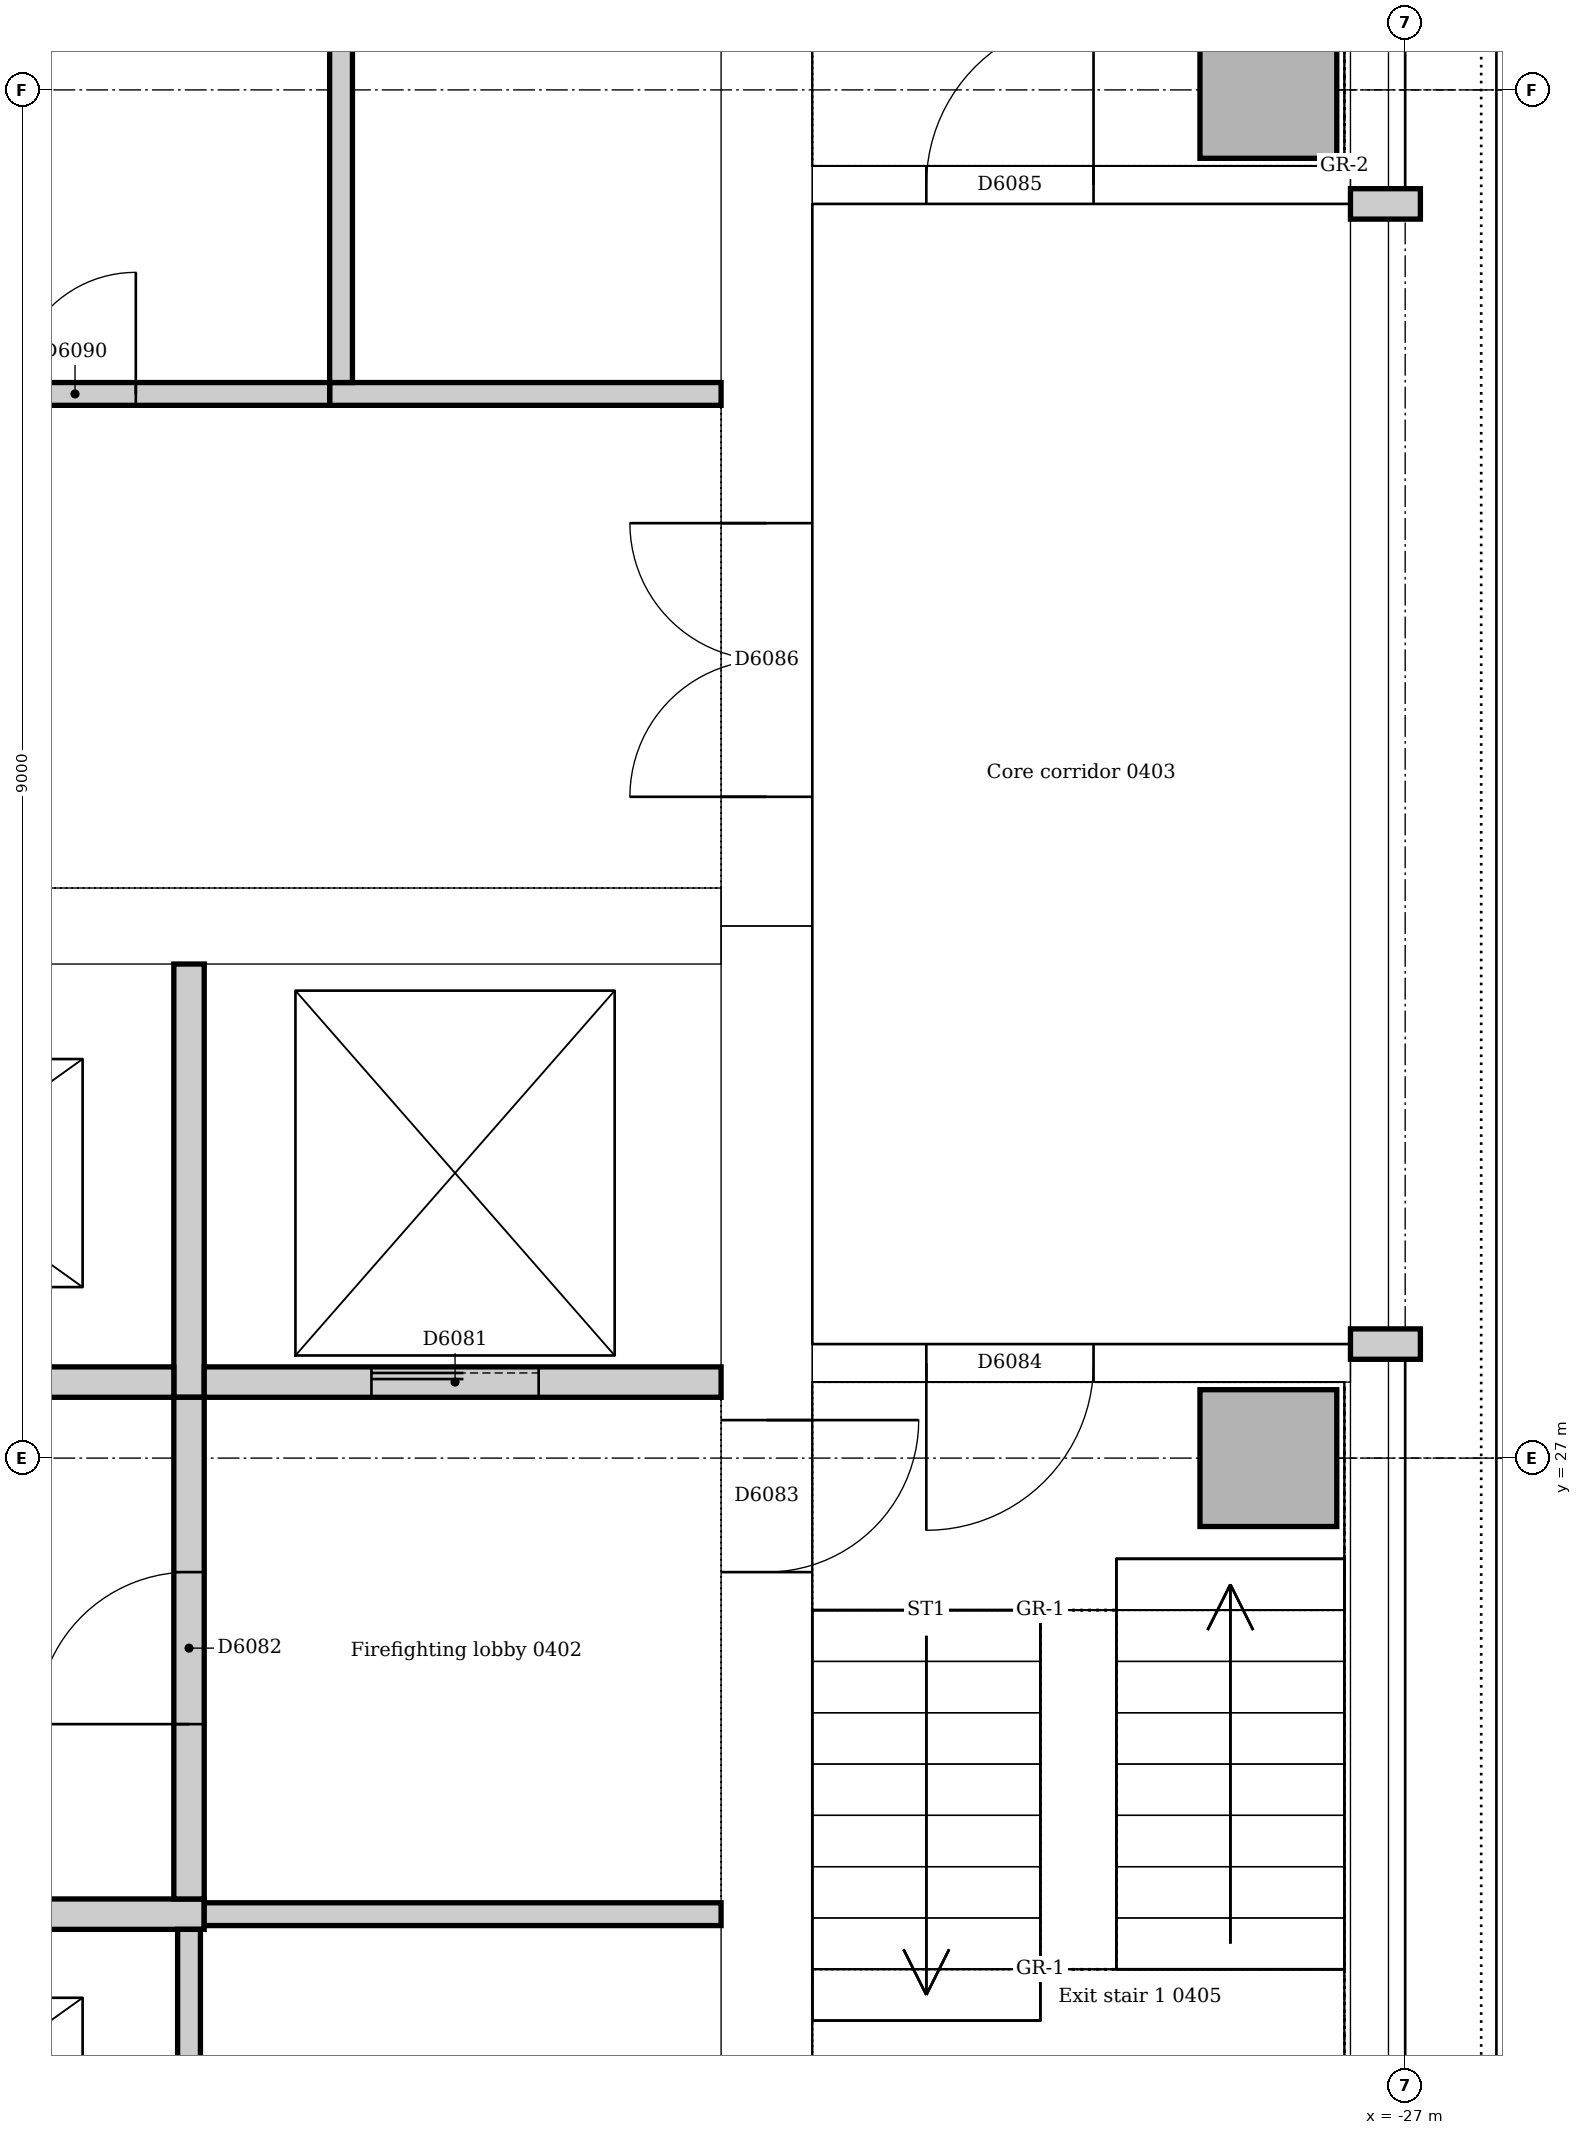
"""IFC4 building model, lengths in metres.
Left out: names, types, materials, properties, quantities, classifications, styles, units other than length and angle.
Written with IfcOpenShell. Run it as: python <this file> out.ifc"""

import sys

from ifc_helpers import new_model, si_unit, direction, frame, frame_2d, origin, origin_2d, place, context, subcontext, project, spatial, rectangle, extrude, element, fill, save


model = new_model("IFC4")
c1 = context("Model", 3, precision=1e-05, world=origin(), true_north=direction((0.0, 1.0)))
c2 = subcontext(c1, "Body", "Model", "MODEL_VIEW")
j1 = project(units=[si_unit("LENGTHUNIT", "METRE"), si_unit("PLANEANGLEUNIT", "RADIAN")], contexts=[c1])
p1 = place(None, origin())
s1 = spatial("IfcSite", under=j1, at=p1, CompositionType="ELEMENT")
p2 = place(p1, origin())
s2 = spatial("IfcBuilding", under=s1, at=p2, CompositionType="ELEMENT")
p3 = place(p2, frame((0.0, 0.0, 21.0)))
s3 = spatial("IfcBuildingStorey", under=s2, at=p3, CompositionType="ELEMENT", Elevation=21.0)
p4 = place(p3, frame((-31.2, 21.0, 0.0), z_axis=(0.0, 0.0, 1.0), x_axis=(0.0, 1.0, 0.0)))
e1 = element("IfcWall", 1, at=p4, inside=s3, PredefinedType="SOLIDWALL", context=c2, shape_type="SweptSolid", body=[
    extrude(rectangle(XDim=9.5, YDim=0.6, at=frame_2d((4.75, 0.0))), origin(), (0.0, 0.0, 1.0), 5.0),
])
p5 = place(p4, frame((5.25, 0.0, 0.0)))
e2 = element("IfcOpeningElement", 2, at=p5, cuts=e1, PredefinedType="OPENING", context=c2, shape_type="SweptSolid", body=[
    extrude(rectangle(XDim=1.0, YDim=2.1, at=frame_2d((0.5, 1.05))), frame((0.0, 0.31, 0.0), z_axis=(0.0, -1.0, 0.0), x_axis=(1.0, 0.0, 0.0)), (0.0, 0.0, 1.0), 0.62),
])
p6 = place(p3, frame((-31.2, 30.5, 0.0), z_axis=(0.0, 0.0, 1.0), x_axis=(0.0, 1.0, 0.0)))
e3 = element("IfcWall", 3, at=p6, inside=s3, PredefinedType="SOLIDWALL", context=c2, shape_type="SweptSolid", body=[
    extrude(rectangle(XDim=11.5, YDim=0.6, at=frame_2d((5.75, 0.0))), origin(), (0.0, 0.0, 1.0), 5.0),
])
p7 = place(p6, frame((0.85, 0.0, 0.0)))
e4 = element("IfcOpeningElement", 4, at=p7, cuts=e3, PredefinedType="OPENING", context=c2, shape_type="SweptSolid", body=[
    extrude(rectangle(XDim=1.8, YDim=2.1, at=frame_2d((0.9, 1.05))), frame((0.0, 0.31, 0.0), z_axis=(0.0, -1.0, 0.0), x_axis=(1.0, 0.0, 0.0)), (0.0, 0.0, 1.0), 0.62),
])
p8 = place(p3, frame((-42.0, 30.5, 0.0), z_axis=(0.0, 0.0, 1.0), x_axis=(1.0, 0.0, 0.0)))
e5 = element("IfcWall", 5, at=p8, inside=s3, PredefinedType="SOLIDWALL", context=c2, shape_type="SweptSolid", body=[
    extrude(rectangle(XDim=10.5, YDim=0.5, at=frame_2d((5.25, 0.0))), origin(), (0.0, 0.0, 1.0), 5.0),
])
p9 = place(p3, frame((-27.36, 27.625, 0.0), z_axis=(0.0, 0.0, 1.0), x_axis=(-1.0, 0.0, 0.0)))
e6 = element("IfcWall", 6, at=p9, inside=s3, PredefinedType="SOLIDWALL", context=c2, shape_type="SweptSolid", body=[
    extrude(rectangle(XDim=3.54, YDim=0.25, at=frame_2d((1.77, 0.0))), origin(), (0.0, 0.0, 1.0), 5.0),
])
p10 = place(p9, frame((1.69, 0.0, 0.0)))
e7 = element("IfcOpeningElement", 7, at=p10, cuts=e6, PredefinedType="OPENING", context=c2, shape_type="SweptSolid", body=[
    extrude(rectangle(XDim=1.1, YDim=2.1, at=frame_2d((0.55, 1.05))), frame((0.0, 0.135, 0.0), z_axis=(0.0, -1.0, 0.0), x_axis=(1.0, 0.0, 0.0)), (0.0, 0.0, 1.0), 0.27),
])
p11 = place(p3, frame((-30.9, 35.375, 0.0), z_axis=(0.0, 0.0, 1.0), x_axis=(1.0, 0.0, 0.0)))
e8 = element("IfcWall", 8, at=p11, inside=s3, PredefinedType="SOLIDWALL", context=c2, shape_type="SweptSolid", body=[
    extrude(rectangle(XDim=3.54, YDim=0.25, at=frame_2d((1.77, 0.0))), origin(), (0.0, 0.0, 1.0), 5.0),
])
p12 = place(p11, frame((0.75, 0.0, 0.0)))
e9 = element("IfcOpeningElement", 9, at=p12, cuts=e8, PredefinedType="OPENING", context=c2, shape_type="SweptSolid", body=[
    extrude(rectangle(XDim=1.1, YDim=2.1, at=frame_2d((0.55, 1.05))), frame((0.0, 0.135, 0.0), z_axis=(0.0, -1.0, 0.0), x_axis=(1.0, 0.0, 0.0)), (0.0, 0.0, 1.0), 0.27),
])
p13 = place(p3, frame((-27.235, 21.0, 0.0), z_axis=(0.0, 0.0, 1.0), x_axis=(0.0, 1.0, 0.0)))
e10 = element("IfcWall", 10, at=p13, inside=s3, PredefinedType="SOLIDWALL", context=c2, shape_type="SweptSolid", body=[
    extrude(rectangle(XDim=6.65, YDim=0.25, at=frame_2d((3.325, 0.0))), origin(), (0.0, 0.0, 1.0), 5.0),
])
p14 = place(p3, frame((-27.235, 27.85, 0.0), z_axis=(0.0, 0.0, 1.0), x_axis=(0.0, 1.0, 0.0)))
e11 = element("IfcWall", 11, at=p14, inside=s3, PredefinedType="SOLIDWALL", context=c2, shape_type="SweptSolid", body=[
    extrude(rectangle(XDim=7.3, YDim=0.25, at=frame_2d((3.65, 0.0))), origin(), (0.0, 0.0, 1.0), 5.0),
])
p15 = place(p3, frame((-27.235, 35.35, 0.0), z_axis=(0.0, 0.0, 1.0), x_axis=(0.0, 1.0, 0.0)))
e12 = element("IfcWall", 12, at=p15, inside=s3, PredefinedType="SOLIDWALL", context=c2, shape_type="SweptSolid", body=[
    extrude(rectangle(XDim=6.65, YDim=0.25, at=frame_2d((3.325, 0.0))), origin(), (0.0, 0.0, 1.0), 5.0),
])
for number, where, z_axis, x_axis in (
    (13, (-27.9, 27.0, 0.0), (0.0, 0.0, 1.0), (1.0, 0.0, 0.0)),
    (14, (-27.9, 36.0, 0.0), (0.0, 0.0, 1.0), (1.0, 0.0, 0.0)),
):
    element("IfcColumn", number, at=place(p3, frame(where, z_axis=z_axis, x_axis=x_axis)), inside=s3, PredefinedType="COLUMN", context=c2, shape_type="SweptSolid", body=[
        extrude(rectangle(XDim=0.9, YDim=0.9, at=origin_2d()), origin(), (0.0, 0.0, 1.0), 5.0),
    ])
p16 = place(p3, frame((-34.9, 24.0, 0.0), z_axis=(0.0, 0.0, 1.0), x_axis=(-1.0, 0.0, 0.0)))
e15 = element("IfcWall", 15, at=p16, inside=s3, PredefinedType="SOLIDWALL", context=c2, shape_type="SweptSolid", body=[
    extrude(rectangle(XDim=3.5, YDim=0.2, at=frame_2d((1.75, 0.0))), origin(), (0.0, 0.0, 1.0), 5.0),
])
p17 = place(p16, frame((1.3, 0.0, 0.0)))
e16 = element("IfcOpeningElement", 16, at=p17, cuts=e15, PredefinedType="OPENING", context=c2, shape_type="SweptSolid", body=[
    extrude(rectangle(XDim=1.1, YDim=2.1, at=frame_2d((0.55, 1.05))), frame((0.0, 0.11, 0.0), z_axis=(0.0, -1.0, 0.0), x_axis=(1.0, 0.0, 0.0)), (0.0, 0.0, 1.0), 0.22),
])
p18 = place(p3, frame((-35.0, 27.4, 0.0), z_axis=(0.0, 0.0, 1.0), x_axis=(0.0, 1.0, 0.0)))
e17 = element("IfcWall", 17, at=p18, inside=s3, PredefinedType="SOLIDWALL", context=c2, shape_type="SweptSolid", body=[
    extrude(rectangle(XDim=2.85, YDim=0.2, at=frame_2d((1.425, 0.0))), origin(), (0.0, 0.0, 1.0), 5.0),
])
p19 = place(p3, frame((-38.4, 27.5, 0.0), z_axis=(0.0, 0.0, 1.0), x_axis=(1.0, 0.0, 0.0)))
e18 = element("IfcWall", 18, at=p19, inside=s3, PredefinedType="SOLIDWALL", context=c2, shape_type="SweptSolid", body=[
    extrude(rectangle(XDim=3.3, YDim=0.2, at=frame_2d((1.65, 0.0))), origin(), (0.0, 0.0, 1.0), 5.0),
])
p20 = place(p19, frame((1.1, 0.0, 0.0)))
e19 = element("IfcOpeningElement", 19, at=p20, cuts=e18, PredefinedType="OPENING", context=c2, shape_type="SweptSolid", body=[
    extrude(rectangle(XDim=1.1, YDim=2.1, at=frame_2d((0.55, 1.05))), frame((0.0, 0.11, 0.0), z_axis=(0.0, -1.0, 0.0), x_axis=(1.0, 0.0, 0.0)), (0.0, 0.0, 1.0), 0.22),
])
p21 = place(p3, frame((-34.9, 27.5, 0.0), z_axis=(0.0, 0.0, 1.0), x_axis=(1.0, 0.0, 0.0)))
e20 = element("IfcWall", 20, at=p21, inside=s3, PredefinedType="SOLIDWALL", context=c2, shape_type="SweptSolid", body=[
    extrude(rectangle(XDim=3.4, YDim=0.2, at=frame_2d((1.7, 0.0))), origin(), (0.0, 0.0, 1.0), 5.0),
])
p22 = place(p21, frame((1.1, 0.0, 0.0)))
e21 = element("IfcOpeningElement", 21, at=p22, cuts=e20, PredefinedType="OPENING", context=c2, shape_type="SweptSolid", body=[
    extrude(rectangle(XDim=1.1, YDim=2.1, at=frame_2d((0.55, 1.05))), frame((0.0, 0.11, 0.0), z_axis=(0.0, -1.0, 0.0), x_axis=(1.0, 0.0, 0.0)), (0.0, 0.0, 1.0), 0.22),
])
p23 = place(p3, frame((-35.0, 24.1, 0.0), z_axis=(0.0, 0.0, 1.0), x_axis=(0.0, 1.0, 0.0)))
e22 = element("IfcWall", 22, at=p23, inside=s3, PredefinedType="SOLIDWALL", context=c2, shape_type="SweptSolid", body=[
    extrude(rectangle(XDim=3.3, YDim=0.2, at=frame_2d((1.65, 0.0))), origin(), (0.0, 0.0, 1.0), 5.0),
])
p24 = place(p23, frame((1.15, 0.0, 0.0)))
e23 = element("IfcOpeningElement", 23, at=p24, cuts=e22, PredefinedType="OPENING", context=c2, shape_type="SweptSolid", body=[
    extrude(rectangle(XDim=1.0, YDim=2.1, at=frame_2d((0.5, 1.05))), frame((0.0, 0.11, 0.0), z_axis=(0.0, -1.0, 0.0), x_axis=(1.0, 0.0, 0.0)), (0.0, 0.0, 1.0), 0.22),
])
for number, where, z_axis, x_axis in (
    (24, (-27.36, 27.75, 0.0), (0.0, 0.0, 1.0), (1.0, 0.0, 0.0)),
    (25, (-26.9, 35.25, 0.0), (0.0, 0.0, 1.0), (-1.0, 0.0, 0.0)),
):
    element("IfcWall", number, at=place(p3, frame(where, z_axis=z_axis, x_axis=x_axis)), inside=s3, PredefinedType="SOLIDWALL", context=c2, shape_type="SweptSolid", body=[
        extrude(rectangle(XDim=0.46, YDim=0.2, at=frame_2d((0.23, 0.0))), origin(), (0.0, 0.0, 1.0), 5.0),
    ])
p25 = place(p3, frame((-35.0, 21.0, 0.0), z_axis=(0.0, 0.0, 1.0), x_axis=(0.0, 1.0, 0.0)))
e26 = element("IfcWall", 26, at=p25, inside=s3, PredefinedType="SOLIDWALL", context=c2, shape_type="SweptSolid", body=[
    extrude(rectangle(XDim=2.9, YDim=0.15, at=frame_2d((1.45, 0.0))), origin(), (0.0, 0.0, 1.0), 5.0),
])
p26 = place(p3, frame((-31.5, 24.0, 0.0), z_axis=(0.0, 0.0, 1.0), x_axis=(-1.0, 0.0, 0.0)))
e27 = element("IfcWall", 27, at=p26, inside=s3, PredefinedType="SOLIDWALL", context=c2, shape_type="SweptSolid", body=[
    extrude(rectangle(XDim=3.4, YDim=0.15, at=frame_2d((1.7, 0.0))), origin(), (0.0, 0.0, 1.0), 5.0),
])
p27 = place(p3, frame((-34.075, 34.0, 0.0), z_axis=(0.0, 0.0, 1.0), x_axis=(1.0, 0.0, 0.0)))
e28 = element("IfcWall", 28, at=p27, inside=s3, PredefinedType="SOLIDWALL", context=c2, shape_type="SweptSolid", body=[
    extrude(rectangle(XDim=2.575, YDim=0.15, at=frame_2d((1.288, 0.0))), origin(), (0.0, 0.0, 1.0), 5.0),
])
p28 = place(p3, frame((-34.0, 41.075, 0.0), z_axis=(0.0, 0.0, 1.0), x_axis=(0.0, -1.0, 0.0)))
e29 = element("IfcWall", 29, at=p28, inside=s3, PredefinedType="SOLIDWALL", context=c2, shape_type="SweptSolid", body=[
    extrude(rectangle(XDim=7.0, YDim=0.15, at=frame_2d((3.5, 0.0))), origin(), (0.0, 0.0, 1.0), 5.0),
])
p29 = place(p3, frame((-34.075, 34.0, 0.0), z_axis=(0.0, 0.0, 1.0), x_axis=(-1.0, 0.0, 0.0)))
e30 = element("IfcWall", 30, at=p29, inside=s3, PredefinedType="PARTITIONING", context=c2, shape_type="SweptSolid", body=[
    extrude(rectangle(XDim=3.35, YDim=0.15, at=frame_2d((1.675, 0.0))), origin(), (0.0, 0.0, 1.0), 4.85),
])
p30 = place(p29, frame((1.275, 0.0, 0.0)))
e31 = element("IfcOpeningElement", 31, at=p30, cuts=e30, PredefinedType="OPENING", context=c2, shape_type="SweptSolid", body=[
    extrude(rectangle(XDim=0.8, YDim=2.1, at=frame_2d((0.4, 1.05))), frame((0.0, 0.085, 0.0), z_axis=(0.0, -1.0, 0.0), x_axis=(1.0, 0.0, 0.0)), (0.0, 0.0, 1.0), 0.17),
])
p31 = place(p22, origin())
e32 = element("IfcDoor", 32, at=p31, inside=s3, OperationType="SLIDING_TO_LEFT", PredefinedType="DOOR", context=c2, shape_type="SweptSolid", body=[
    extrude(rectangle(XDim=1.1, YDim=2.1, at=frame_2d((0.55, 1.05))), frame((0.0, 0.025, 0.0), z_axis=(0.0, -1.0, 0.0), x_axis=(1.0, 0.0, 0.0)), (0.0, 0.0, 1.0), 0.05),
])
fill(e21, e32)
p32 = place(p24, origin())
e33 = element("IfcDoor", 33, at=p32, inside=s3, OperationType="SINGLE_SWING_LEFT", PredefinedType="DOOR", context=c2, shape_type="SweptSolid", body=[
    extrude(rectangle(XDim=1.0, YDim=2.1, at=frame_2d((0.5, 1.05))), frame((0.0, 0.025, 0.0), z_axis=(0.0, -1.0, 0.0), x_axis=(1.0, 0.0, 0.0)), (0.0, 0.0, 1.0), 0.05),
])
fill(e23, e33)
p33 = place(p5, frame((1.0, 0.0, 0.0), z_axis=(0.0, 0.0, 1.0), x_axis=(-1.0, 0.0, 0.0)))
e34 = element("IfcDoor", 34, at=p33, inside=s3, OperationType="SINGLE_SWING_LEFT", PredefinedType="DOOR", context=c2, shape_type="SweptSolid", body=[
    extrude(rectangle(XDim=1.0, YDim=2.1, at=frame_2d((0.5, 1.05))), frame((0.0, 0.025, 0.0), z_axis=(0.0, -1.0, 0.0), x_axis=(1.0, 0.0, 0.0)), (0.0, 0.0, 1.0), 0.05),
])
fill(e2, e34)
p34 = place(p10, origin())
e35 = element("IfcDoor", 35, at=p34, inside=s3, OperationType="SINGLE_SWING_RIGHT", PredefinedType="DOOR", context=c2, shape_type="SweptSolid", body=[
    extrude(rectangle(XDim=1.1, YDim=2.1, at=frame_2d((0.55, 1.05))), frame((0.0, 0.025, 0.0), z_axis=(0.0, -1.0, 0.0), x_axis=(1.0, 0.0, 0.0)), (0.0, 0.0, 1.0), 0.05),
])
fill(e7, e35)
p35 = place(p12, origin())
e36 = element("IfcDoor", 36, at=p35, inside=s3, OperationType="SINGLE_SWING_RIGHT", PredefinedType="DOOR", context=c2, shape_type="SweptSolid", body=[
    extrude(rectangle(XDim=1.1, YDim=2.1, at=frame_2d((0.55, 1.05))), frame((0.0, 0.025, 0.0), z_axis=(0.0, -1.0, 0.0), x_axis=(1.0, 0.0, 0.0)), (0.0, 0.0, 1.0), 0.05),
])
fill(e9, e36)
p36 = place(p7, origin())
e37 = element("IfcDoor", 37, at=p36, inside=s3, OperationType="DOUBLE_DOOR_SINGLE_SWING", PredefinedType="DOOR", context=c2, shape_type="SweptSolid", body=[
    extrude(rectangle(XDim=1.8, YDim=2.1, at=frame_2d((0.9, 1.05))), frame((0.0, 0.025, 0.0), z_axis=(0.0, -1.0, 0.0), x_axis=(1.0, 0.0, 0.0)), (0.0, 0.0, 1.0), 0.05),
])
fill(e4, e37)
p37 = place(p30, frame((0.8, 0.0, 0.0), z_axis=(0.0, 0.0, 1.0), x_axis=(-1.0, 0.0, 0.0)))
e38 = element("IfcDoor", 38, at=p37, inside=s3, OperationType="SINGLE_SWING_RIGHT", PredefinedType="DOOR", context=c2, shape_type="SweptSolid", body=[
    extrude(rectangle(XDim=0.8, YDim=2.1, at=frame_2d((0.4, 1.05))), frame((0.0, 0.025, 0.0), z_axis=(0.0, -1.0, 0.0), x_axis=(1.0, 0.0, 0.0)), (0.0, 0.0, 1.0), 0.05),
])
fill(e31, e38)
save(model, sys.argv[1])
